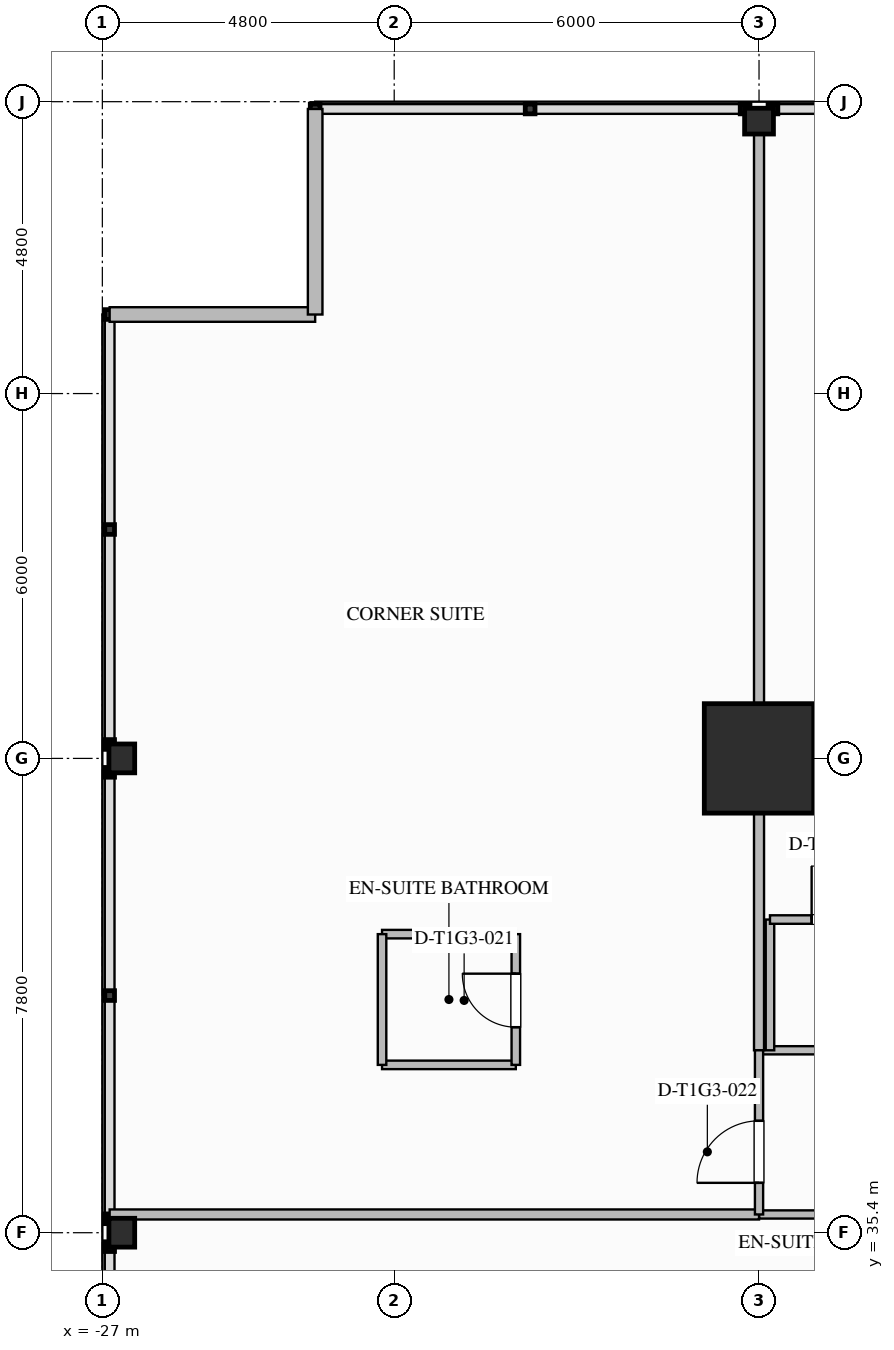
"""IFC4 building model, lengths in metres.
Left out: names, types, materials, properties, quantities, classifications, styles, units other than length and angle.
Written with IfcOpenShell. Run it as: python <this file> out.ifc"""

import sys

from ifc_helpers import new_model, si_unit, direction, frame, frame_2d, origin, origin_2d, place, context, subcontext, project, spatial, rectangle, i_section, extrude, element, fill, save


model = new_model("IFC4")
c1 = context("Model", 3, precision=1e-05, world=origin(), true_north=direction((0.0, 1.0)))
c2 = subcontext(c1, "Body", "Model", "MODEL_VIEW")
j1 = project(units=[si_unit("LENGTHUNIT", "METRE"), si_unit("PLANEANGLEUNIT", "RADIAN")], contexts=[c1])
p1 = place(None, origin())
s1 = spatial("IfcSite", under=j1, at=p1, CompositionType="ELEMENT")
p2 = place(p1, origin())
s2 = spatial("IfcBuilding", under=s1, at=p2, CompositionType="ELEMENT")
p3 = place(p2, frame((0.0, 0.0, 61.2)))
s3 = spatial("IfcBuildingStorey", under=s2, at=p3, CompositionType="ELEMENT", Elevation=61.2)
p4 = place(p3, frame((-16.2, 43.2, 0.0), z_axis=(0.0, 0.0, 1.0), x_axis=(1.0, 0.0, 0.0)))
e1 = element("IfcColumn", 1, at=p4, inside=s3, PredefinedType="COLUMN", context=c2, shape_type="SweptSolid", body=[
    extrude(rectangle(XDim=1.8, YDim=1.8, at=origin_2d()), origin(), (0.0, 0.0, 1.0), 3.5),
])
for number, where, z_axis, x_axis in (
    (2, (-26.68, 35.4, 0.0), (0.0, 0.0, 1.0), (1.0, 0.0, 0.0)),
    (3, (-26.68, 43.2, 0.0), (0.0, 0.0, 1.0), (1.0, 0.0, 0.0)),
    (4, (-16.2, 53.68, 0.0), (0.0, 0.0, 1.0), (0.0, 1.0, 0.0)),
):
    element("IfcColumn", number, at=place(p3, frame(where, z_axis=z_axis, x_axis=x_axis)), inside=s3, PredefinedType="COLUMN", context=c2, shape_type="SweptSolid", body=[
        extrude(i_section(OverallWidth=0.424, OverallDepth=0.474, WebThickness=0.048, FlangeThickness=0.077, FilletRadius=0.03, at=origin_2d()), origin(), (0.0, 0.0, 1.0), 3.497),
    ])
for number, where, z_axis, x_axis in (
    (5, (-26.88, 50.5, 0.0), (0.0, 0.0, 1.0), (1.0, 0.0, 0.0)),
    (6, (-23.5, 50.5, 0.0), (0.0, 0.0, 1.0), (0.0, 1.0, 0.0)),
):
    element("IfcWall", number, at=place(p3, frame(where, z_axis=z_axis, x_axis=x_axis)), inside=s3, PredefinedType="STANDARD", context=c2, shape_type="SweptSolid", body=[
        extrude(rectangle(XDim=3.38, YDim=0.24, at=frame_2d((1.69, 0.0))), origin(), (0.0, 0.0, 1.0), 3.24),
    ])
p5 = place(p3, frame((-16.2, 38.4, 0.0), z_axis=(0.0, 0.0, 1.0), x_axis=(1.0, 0.0, 0.0)))
e7 = element("IfcWall", 7, at=p5, inside=s3, PredefinedType="PARTITIONING", context=c2, shape_type="SweptSolid", body=[
    extrude(rectangle(XDim=32.4, YDim=0.135, at=frame_2d((16.2, 0.0))), origin(), (0.0, 0.0, 1.0), 3.24),
])
p6 = place(p5, frame((4.095, 0.0, 0.0)))
e8 = element("IfcOpeningElement", 8, at=p6, cuts=e7, PredefinedType="OPENING", context=c2, shape_type="SweptSolid", body=[
    extrude(rectangle(XDim=1.26, YDim=2.2, at=frame_2d((0.63, 1.1))), frame((0.0, 0.077, 0.0), z_axis=(0.0, -1.0, 0.0), x_axis=(1.0, 0.0, 0.0)), (0.0, 0.0, 1.0), 0.155),
])
p7 = place(p5, frame((7.875, 0.0, 0.0)))
e9 = element("IfcOpeningElement", 9, at=p7, cuts=e7, PredefinedType="OPENING", context=c2, shape_type="SweptSolid", body=[
    extrude(rectangle(XDim=1.26, YDim=2.2, at=frame_2d((0.63, 1.1))), frame((0.0, 0.077, 0.0), z_axis=(0.0, -1.0, 0.0), x_axis=(1.0, 0.0, 0.0)), (0.0, 0.0, 1.0), 0.155),
])
p8 = place(p5, frame((15.69, 0.0, 0.0)))
e10 = element("IfcOpeningElement", 10, at=p8, cuts=e7, PredefinedType="OPENING", context=c2, shape_type="SweptSolid", body=[
    extrude(rectangle(XDim=1.02, YDim=2.15, at=frame_2d((0.51, 1.075))), frame((0.0, 0.077, 0.0), z_axis=(0.0, -1.0, 0.0), x_axis=(1.0, 0.0, 0.0)), (0.0, 0.0, 1.0), 0.155),
])
p9 = place(p5, frame((21.645, 0.0, 0.0)))
e11 = element("IfcOpeningElement", 11, at=p9, cuts=e7, PredefinedType="OPENING", context=c2, shape_type="SweptSolid", body=[
    extrude(rectangle(XDim=1.26, YDim=2.2, at=frame_2d((0.63, 1.1))), frame((0.0, 0.077, 0.0), z_axis=(0.0, -1.0, 0.0), x_axis=(1.0, 0.0, 0.0)), (0.0, 0.0, 1.0), 0.155),
])
p10 = place(p5, frame((30.285, 0.0, 0.0)))
e12 = element("IfcOpeningElement", 12, at=p10, cuts=e7, PredefinedType="OPENING", context=c2, shape_type="SweptSolid", body=[
    extrude(rectangle(XDim=1.26, YDim=2.2, at=frame_2d((0.63, 1.1))), frame((0.0, 0.077, 0.0), z_axis=(0.0, -1.0, 0.0), x_axis=(1.0, 0.0, 0.0)), (0.0, 0.0, 1.0), 0.155),
])
p11 = place(p3, frame((-16.2, 35.7, 0.0), z_axis=(0.0, 0.0, 1.0), x_axis=(1.0, 0.0, 0.0)))
e13 = element("IfcWall", 13, at=p11, inside=s3, PredefinedType="PARTITIONING", context=c2, shape_type="SweptSolid", body=[
    extrude(rectangle(XDim=5.4, YDim=0.135, at=frame_2d((2.7, 0.0))), origin(), (0.0, 0.0, 1.0), 3.24),
])
p12 = place(p3, frame((-16.2, 38.4, 0.0), z_axis=(0.0, 0.0, 1.0), x_axis=(0.0, 1.0, 0.0)))
e14 = element("IfcWall", 14, at=p12, inside=s3, PredefinedType="PARTITIONING", context=c2, shape_type="SweptSolid", body=[
    extrude(rectangle(XDim=15.48, YDim=0.165, at=frame_2d((7.74, 0.0))), origin(), (0.0, 0.0, 1.0), 2.452),
])
p13 = place(p3, frame((-26.88, 35.7, 0.0), z_axis=(0.0, 0.0, 1.0), x_axis=(1.0, 0.0, 0.0)))
e15 = element("IfcWall", 15, at=p13, inside=s3, PredefinedType="PARTITIONING", context=c2, shape_type="SweptSolid", body=[
    extrude(rectangle(XDim=10.68, YDim=0.165, at=frame_2d((5.34, 0.0))), origin(), (0.0, 0.0, 1.0), 2.452),
])
p14 = place(p3, frame((-16.2, 35.7, 0.0), z_axis=(0.0, 0.0, 1.0), x_axis=(0.0, 1.0, 0.0)))
e16 = element("IfcWall", 16, at=p14, inside=s3, PredefinedType="PARTITIONING", context=c2, shape_type="SweptSolid", body=[
    extrude(rectangle(XDim=2.7, YDim=0.135, at=frame_2d((1.35, 0.0))), origin(), (0.0, 0.0, 1.0), 2.452),
])
p15 = place(p14, frame((0.52, 0.0, 0.0)))
e17 = element("IfcOpeningElement", 17, at=p15, cuts=e16, PredefinedType="OPENING", context=c2, shape_type="SweptSolid", body=[
    extrude(rectangle(XDim=1.02, YDim=2.15, at=frame_2d((0.51, 1.075))), frame((0.0, 0.077, 0.0), z_axis=(0.0, -1.0, 0.0), x_axis=(1.0, 0.0, 0.0)), (0.0, 0.0, 1.0), 0.155),
])
for number, where, z_axis, x_axis in (
    (18, (-22.4, 38.16, 0.0), (0.0, 0.0, 1.0), (1.0, 0.0, 0.0)),
    (19, (-22.4, 40.31, 0.0), (0.0, 0.0, 1.0), (1.0, 0.0, 0.0)),
):
    element("IfcWall", number, at=place(p3, frame(where, z_axis=z_axis, x_axis=x_axis)), inside=s3, PredefinedType="PLUMBINGWALL", context=c2, shape_type="SweptSolid", body=[
        extrude(rectangle(XDim=2.2, YDim=0.14, at=frame_2d((1.1, 0.0))), origin(), (0.0, 0.0, 1.0), 3.24),
    ])
p16 = place(p3, frame((-22.4, 38.16, 0.0), z_axis=(0.0, 0.0, 1.0), x_axis=(0.0, 1.0, 0.0)))
e20 = element("IfcWall", 20, at=p16, inside=s3, PredefinedType="PLUMBINGWALL", context=c2, shape_type="SweptSolid", body=[
    extrude(rectangle(XDim=2.15, YDim=0.14, at=frame_2d((1.075, 0.0))), origin(), (0.0, 0.0, 1.0), 3.24),
])
p17 = place(p3, frame((-20.2, 38.16, 0.0), z_axis=(0.0, 0.0, 1.0), x_axis=(0.0, 1.0, 0.0)))
e21 = element("IfcWall", 21, at=p17, inside=s3, PredefinedType="PLUMBINGWALL", context=c2, shape_type="SweptSolid", body=[
    extrude(rectangle(XDim=2.15, YDim=0.14, at=frame_2d((1.075, 0.0))), origin(), (0.0, 0.0, 1.0), 3.24),
])
p18 = place(p17, frame((0.62, 0.0, 0.0)))
e22 = element("IfcOpeningElement", 22, at=p18, cuts=e21, PredefinedType="OPENING", context=c2, shape_type="SweptSolid", body=[
    extrude(rectangle(XDim=0.88, YDim=2.1, at=frame_2d((0.44, 1.05))), frame((0.0, 0.08, 0.0), z_axis=(0.0, -1.0, 0.0), x_axis=(1.0, 0.0, 0.0)), (0.0, 0.0, 1.0), 0.16),
])
p19 = place(p3, frame((-16.02, 38.4, 0.0), z_axis=(0.0, 0.0, 1.0), x_axis=(0.0, 1.0, 0.0)))
e23 = element("IfcWall", 23, at=p19, inside=s3, PredefinedType="PLUMBINGWALL", context=c2, shape_type="SweptSolid", body=[
    extrude(rectangle(XDim=2.15, YDim=0.14, at=frame_2d((1.075, 0.0))), origin(), (0.0, 0.0, 1.0), 2.452),
])
p20 = place(p3, frame((-16.02, 40.55, 0.0), z_axis=(0.0, 0.0, 1.0), x_axis=(1.0, 0.0, 0.0)))
e24 = element("IfcWall", 24, at=p20, inside=s3, PredefinedType="PLUMBINGWALL", context=c2, shape_type="SweptSolid", body=[
    extrude(rectangle(XDim=2.25, YDim=0.14, at=frame_2d((1.125, 0.0))), origin(), (0.0, 0.0, 1.0), 3.24),
])
p21 = place(p20, frame((0.685, 0.0, 0.0)))
e25 = element("IfcOpeningElement", 25, at=p21, cuts=e24, PredefinedType="OPENING", context=c2, shape_type="SweptSolid", body=[
    extrude(rectangle(XDim=0.88, YDim=2.1, at=frame_2d((0.44, 1.05))), frame((0.0, 0.08, 0.0), z_axis=(0.0, -1.0, 0.0), x_axis=(1.0, 0.0, 0.0)), (0.0, 0.0, 1.0), 0.16),
])
p22 = place(p18, origin())
e26 = element("IfcDoor", 26, at=p22, inside=s3, OperationType="SINGLE_SWING_RIGHT", PredefinedType="DOOR", context=c2, shape_type="SweptSolid", body=[
    extrude(rectangle(XDim=0.88, YDim=2.1, at=frame_2d((0.44, 1.05))), frame((0.0, 0.025, 0.0), z_axis=(0.0, -1.0, 0.0), x_axis=(1.0, 0.0, 0.0)), (0.0, 0.0, 1.0), 0.05),
])
fill(e22, e26)
p23 = place(p15, origin())
e27 = element("IfcDoor", 27, at=p23, inside=s3, OperationType="SINGLE_SWING_LEFT", PredefinedType="DOOR", context=c2, shape_type="SweptSolid", body=[
    extrude(rectangle(XDim=1.02, YDim=2.15, at=frame_2d((0.51, 1.075))), frame((0.0, 0.025, 0.0), z_axis=(0.0, -1.0, 0.0), x_axis=(1.0, 0.0, 0.0)), (0.0, 0.0, 1.0), 0.05),
])
fill(e17, e27)
p24 = place(p21, origin())
e28 = element("IfcDoor", 28, at=p24, inside=s3, OperationType="SINGLE_SWING_LEFT", PredefinedType="DOOR", context=c2, shape_type="SweptSolid", body=[
    extrude(rectangle(XDim=0.88, YDim=2.1, at=frame_2d((0.44, 1.05))), frame((0.0, 0.025, 0.0), z_axis=(0.0, -1.0, 0.0), x_axis=(1.0, 0.0, 0.0)), (0.0, 0.0, 1.0), 0.05),
])
fill(e25, e28)
save(model, sys.argv[1])
